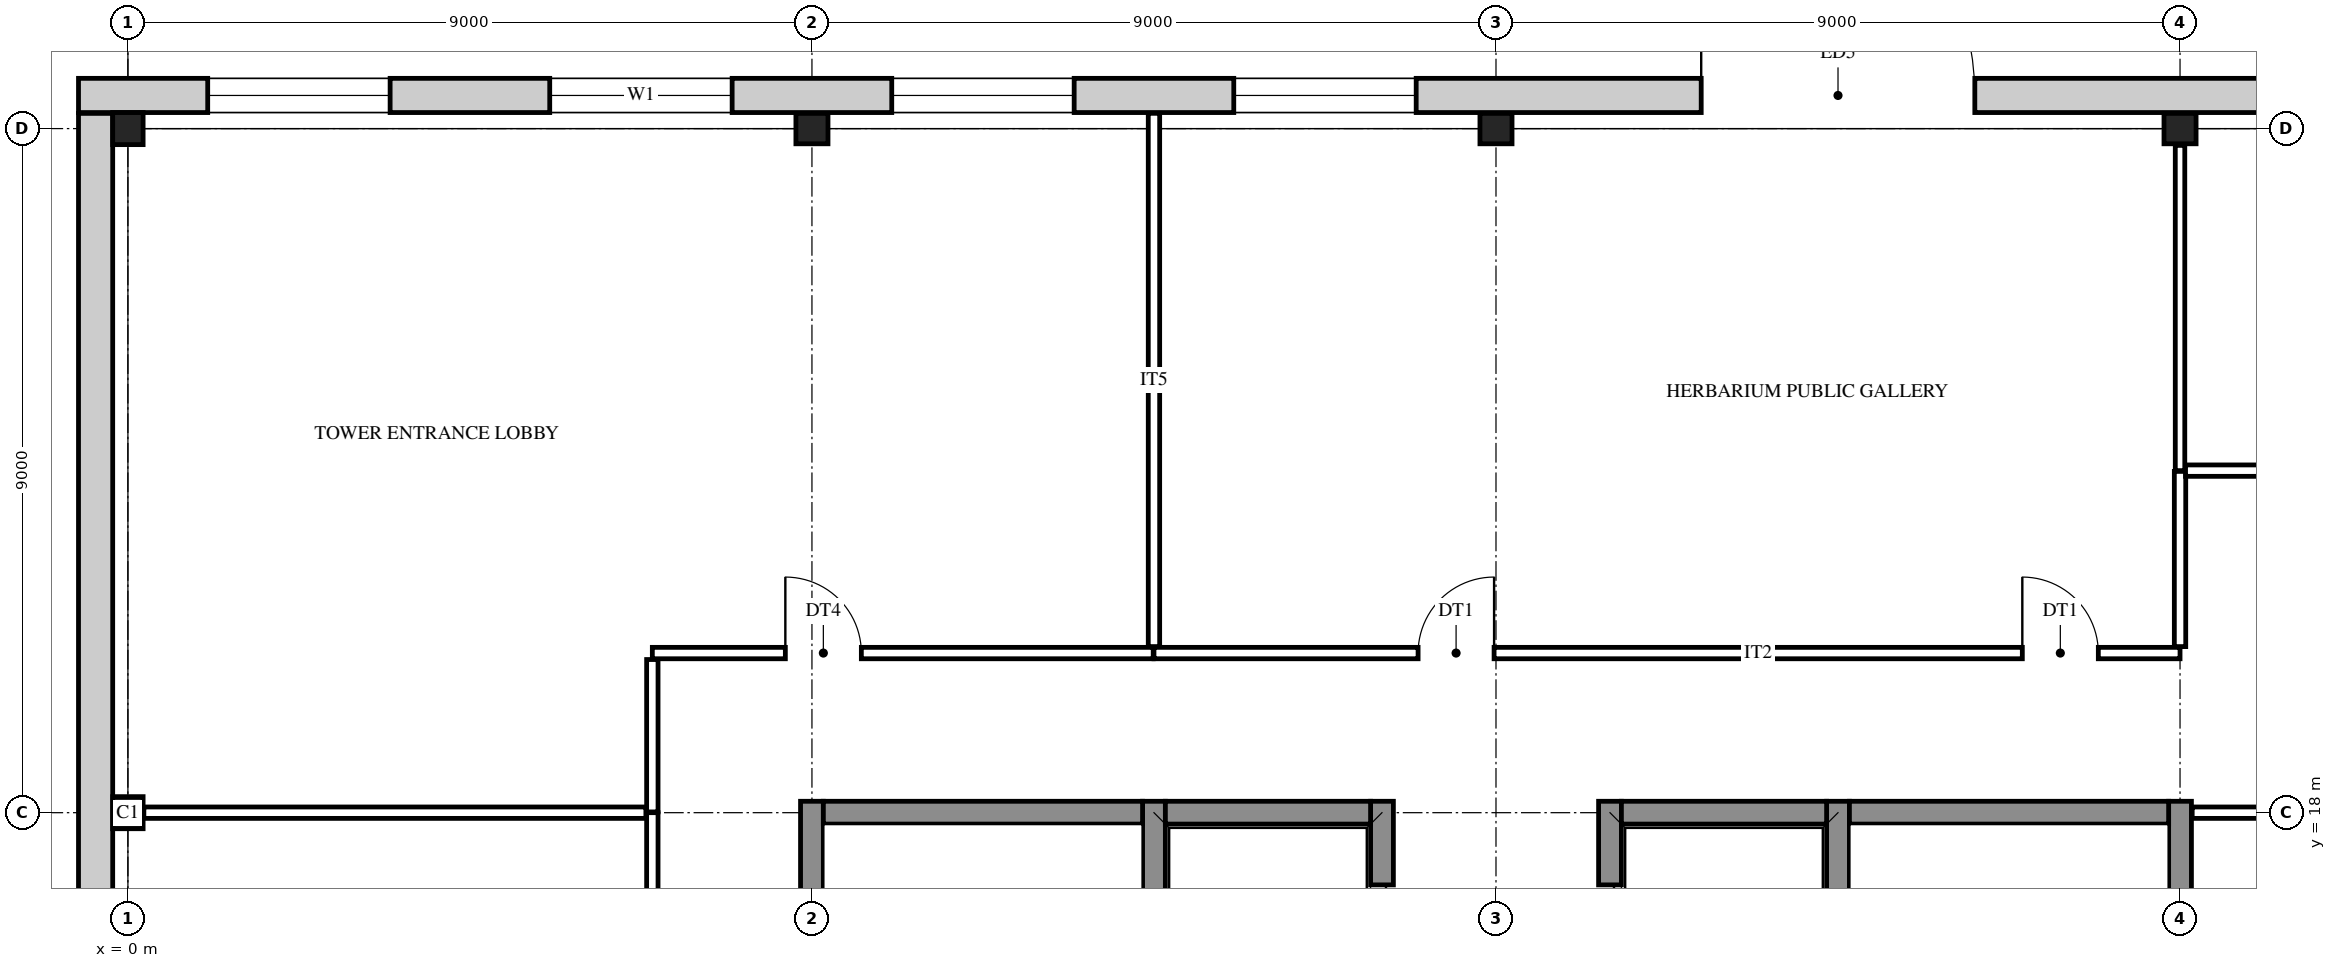
"""IFC4 building model, lengths in metres.
Left out: names, types, materials, properties, quantities, classifications, styles, units other than length and angle.
Written with IfcOpenShell. Run it as: python <this file> out.ifc"""

import sys

from ifc_helpers import new_model, si_unit, direction, frame, frame_2d, origin, origin_2d, place, context, subcontext, project, spatial, rectangle, i_section, extrude, element, fill, save


model = new_model("IFC4")
c1 = context("Model", 3, precision=1e-05, world=origin(), true_north=direction((0.0, 1.0)))
c2 = subcontext(c1, "Body", "Model", "MODEL_VIEW")
j1 = project(units=[si_unit("LENGTHUNIT", "METRE"), si_unit("PLANEANGLEUNIT", "RADIAN")], contexts=[c1])
p1 = place(None, origin())
s1 = spatial("IfcSite", under=j1, at=p1, CompositionType="ELEMENT")
p2 = place(p1, origin())
s2 = spatial("IfcBuilding", under=s1, at=p2, CompositionType="ELEMENT")
p3 = place(p2, origin())
s3 = spatial("IfcBuildingStorey", under=s2, at=p3, CompositionType="ELEMENT", Elevation=0.0)
for number, where, z_axis, x_axis in (
    (1, (0.0, 18.0, 0.0), (0.0, 0.0, 1.0), (1.0, 0.0, 0.0)),
    (2, (0.0, 27.0, 0.0), (0.0, 0.0, 1.0), (1.0, 0.0, 0.0)),
    (3, (9.0, 27.0, 0.0), (0.0, 0.0, 1.0), (0.0, 1.0, 0.0)),
    (4, (18.0, 27.0, 0.0), (0.0, 0.0, 1.0), (0.0, 1.0, 0.0)),
    (5, (27.0, 27.0, 0.0), (0.0, 0.0, 1.0), (0.0, 1.0, 0.0)),
):
    element("IfcColumn", number, at=place(p3, frame(where, z_axis=z_axis, x_axis=x_axis)), inside=s3, PredefinedType="COLUMN", context=c2, shape_type="SweptSolid", body=[
        extrude(i_section(OverallWidth=0.4, OverallDepth=0.422, WebThickness=0.028, FlangeThickness=0.036, at=origin_2d()), origin(), (0.0, 0.0, 1.0), 6.0),
    ])
for number, where, z_axis, x_axis in (
    (6, (9.0, 8.85, 0.0), (0.0, 0.0, 1.0), (0.0, 1.0, 0.0)),
    (7, (13.5, 8.85, 0.0), (0.0, 0.0, 1.0), (0.0, 1.0, 0.0)),
):
    element("IfcWall", number, at=place(p3, frame(where, z_axis=z_axis, x_axis=x_axis)), inside=s3, PredefinedType="SHEAR", context=c2, shape_type="SweptSolid", body=[
        extrude(rectangle(XDim=9.3, YDim=0.3, at=frame_2d((4.65, 0.0))), origin(), (0.0, 0.0, 1.0), 6.0),
    ])
p4 = place(p3, frame((16.5, 8.85, 0.0), z_axis=(0.0, 0.0, 1.0), x_axis=(0.0, 1.0, 0.0)))
e8 = element("IfcWall", 8, at=p4, inside=s3, PredefinedType="SHEAR", context=c2, shape_type="SweptSolid", body=[
    extrude(rectangle(XDim=9.3, YDim=0.3, at=frame_2d((4.65, 0.0))), origin(), (0.0, 0.0, 1.0), 6.0),
])
p5 = place(p4, frame((1.1, 0.0, 0.0)))
e9 = element("IfcOpeningElement", 9, at=p5, cuts=e8, PredefinedType="OPENING", context=c2, shape_type="SweptSolid", body=[
    extrude(rectangle(XDim=1.1, YDim=2.1, at=frame_2d((0.55, 1.05))), frame((0.0, 0.16, 0.0), z_axis=(0.0, -1.0, 0.0), x_axis=(1.0, 0.0, 0.0)), (0.0, 0.0, 1.0), 0.32),
])
p6 = place(p4, frame((4.1, 0.0, 0.0)))
e10 = element("IfcOpeningElement", 10, at=p6, cuts=e8, PredefinedType="OPENING", context=c2, shape_type="SweptSolid", body=[
    extrude(rectangle(XDim=1.1, YDim=2.1, at=frame_2d((0.55, 1.05))), frame((0.0, 0.16, 0.0), z_axis=(0.0, -1.0, 0.0), x_axis=(1.0, 0.0, 0.0)), (0.0, 0.0, 1.0), 0.32),
])
p7 = place(p4, frame((7.1, 0.0, 0.0)))
e11 = element("IfcOpeningElement", 11, at=p7, cuts=e8, PredefinedType="OPENING", context=c2, shape_type="SweptSolid", body=[
    extrude(rectangle(XDim=1.1, YDim=2.1, at=frame_2d((0.55, 1.05))), frame((0.0, 0.16, 0.0), z_axis=(0.0, -1.0, 0.0), x_axis=(1.0, 0.0, 0.0)), (0.0, 0.0, 1.0), 0.32),
])
p8 = place(p3, frame((19.5, 8.85, 0.0), z_axis=(0.0, 0.0, 1.0), x_axis=(0.0, 1.0, 0.0)))
e12 = element("IfcWall", 12, at=p8, inside=s3, PredefinedType="SHEAR", context=c2, shape_type="SweptSolid", body=[
    extrude(rectangle(XDim=9.3, YDim=0.3, at=frame_2d((4.65, 0.0))), origin(), (0.0, 0.0, 1.0), 6.0),
])
p9 = place(p8, frame((1.1, 0.0, 0.0)))
e13 = element("IfcOpeningElement", 13, at=p9, cuts=e12, PredefinedType="OPENING", context=c2, shape_type="SweptSolid", body=[
    extrude(rectangle(XDim=1.1, YDim=2.1, at=frame_2d((0.55, 1.05))), frame((0.0, 0.16, 0.0), z_axis=(0.0, -1.0, 0.0), x_axis=(1.0, 0.0, 0.0)), (0.0, 0.0, 1.0), 0.32),
])
p10 = place(p8, frame((3.95, 0.0, 0.0)))
e14 = element("IfcOpeningElement", 14, at=p10, cuts=e12, PredefinedType="OPENING", context=c2, shape_type="SweptSolid", body=[
    extrude(rectangle(XDim=1.4, YDim=2.1, at=frame_2d((0.7, 1.05))), frame((0.0, 0.16, 0.0), z_axis=(0.0, -1.0, 0.0), x_axis=(1.0, 0.0, 0.0)), (0.0, 0.0, 1.0), 0.32),
])
p11 = place(p8, frame((7.1, 0.0, 0.0)))
e15 = element("IfcOpeningElement", 15, at=p11, cuts=e12, PredefinedType="OPENING", context=c2, shape_type="SweptSolid", body=[
    extrude(rectangle(XDim=1.1, YDim=2.1, at=frame_2d((0.55, 1.05))), frame((0.0, 0.16, 0.0), z_axis=(0.0, -1.0, 0.0), x_axis=(1.0, 0.0, 0.0)), (0.0, 0.0, 1.0), 0.32),
])
for number, where, z_axis, x_axis in (
    (16, (22.5, 8.85, 0.0), (0.0, 0.0, 1.0), (0.0, 1.0, 0.0)),
    (17, (27.0, 8.85, 0.0), (0.0, 0.0, 1.0), (0.0, 1.0, 0.0)),
):
    element("IfcWall", number, at=place(p3, frame(where, z_axis=z_axis, x_axis=x_axis)), inside=s3, PredefinedType="SHEAR", context=c2, shape_type="SweptSolid", body=[
        extrude(rectangle(XDim=9.3, YDim=0.3, at=frame_2d((4.65, 0.0))), origin(), (0.0, 0.0, 1.0), 6.0),
    ])
p12 = place(p3, frame((9.15, 18.0, 0.0), z_axis=(0.0, 0.0, 1.0), x_axis=(1.0, 0.0, 0.0)))
e18 = element("IfcWall", 18, at=p12, inside=s3, PredefinedType="SHEAR", context=c2, shape_type="SweptSolid", body=[
    extrude(rectangle(XDim=4.2, YDim=0.3, at=frame_2d((2.1, 0.0))), origin(), (0.0, 0.0, 1.0), 6.0),
])
for number, where, z_axis, x_axis in (
    (19, (13.65, 18.0, 0.0), (0.0, 0.0, 1.0), (1.0, 0.0, 0.0)),
    (20, (19.65, 18.0, 0.0), (0.0, 0.0, 1.0), (1.0, 0.0, 0.0)),
):
    element("IfcWall", number, at=place(p3, frame(where, z_axis=z_axis, x_axis=x_axis)), inside=s3, PredefinedType="SHEAR", context=c2, shape_type="SweptSolid", body=[
        extrude(rectangle(XDim=2.7, YDim=0.3, at=frame_2d((1.35, 0.0))), origin(), (0.0, 0.0, 1.0), 6.0),
    ])
p13 = place(p3, frame((22.65, 18.0, 0.0), z_axis=(0.0, 0.0, 1.0), x_axis=(1.0, 0.0, 0.0)))
e21 = element("IfcWall", 21, at=p13, inside=s3, PredefinedType="SHEAR", context=c2, shape_type="SweptSolid", body=[
    extrude(rectangle(XDim=4.2, YDim=0.3, at=frame_2d((2.1, 0.0))), origin(), (0.0, 0.0, 1.0), 6.0),
])
p14 = place(p3, frame((-0.425, -0.2, 0.0), z_axis=(0.0, 0.0, 1.0), x_axis=(0.0, 1.0, 0.0)))
e22 = element("IfcWall", 22, at=p14, inside=s3, PredefinedType="STANDARD", context=c2, shape_type="SweptSolid", body=[
    extrude(rectangle(XDim=27.4, YDim=0.45, at=frame_2d((13.7, 0.0))), origin(), (0.0, 0.0, 1.0), 6.0),
])
p15 = place(p14, frame((14.6, 0.0, 0.012)))
e23 = element("IfcOpeningElement", 23, at=p15, cuts=e22, PredefinedType="OPENING", context=c2, shape_type="SweptSolid", body=[
    extrude(rectangle(XDim=2.4, YDim=2.4, at=frame_2d((1.2, 1.2))), frame((0.0, 0.235, 0.0), z_axis=(0.0, -1.0, 0.0), x_axis=(1.0, 0.0, 0.0)), (0.0, 0.0, 1.0), 0.47),
])
p16 = place(p14, frame((4.1, 0.0, 0.012)))
e24 = element("IfcOpeningElement", 24, at=p16, cuts=e22, PredefinedType="OPENING", context=c2, shape_type="SweptSolid", body=[
    extrude(rectangle(XDim=1.2, YDim=2.4, at=frame_2d((0.6, 1.2))), frame((0.0, 0.235, 0.0), z_axis=(0.0, -1.0, 0.0), x_axis=(1.0, 0.0, 0.0)), (0.0, 0.0, 1.0), 0.47),
])
p17 = place(p14, frame((10.25, 0.0, 0.9)))
e25 = element("IfcOpeningElement", 25, at=p17, cuts=e22, PredefinedType="OPENING", context=c2, shape_type="SweptSolid", body=[
    extrude(rectangle(XDim=2.4, YDim=3.5, at=frame_2d((1.2, 1.75))), frame((0.0, 0.235, 0.0), z_axis=(0.0, -1.0, 0.0), x_axis=(1.0, 0.0, 0.0)), (0.0, 0.0, 1.0), 0.47),
])
p18 = place(p3, frame((-0.65, 27.436, 0.0), z_axis=(0.0, 0.0, 1.0), x_axis=(1.0, 0.0, 0.0)))
e26 = element("IfcWall", 26, at=p18, inside=s3, PredefinedType="STANDARD", context=c2, shape_type="SweptSolid", body=[
    extrude(rectangle(XDim=32.8, YDim=0.45, at=frame_2d((16.4, 0.0))), origin(), (0.0, 0.0, 1.0), 6.0),
])
p19 = place(p18, frame((21.35, 0.0, 0.012)))
e27 = element("IfcOpeningElement", 27, at=p19, cuts=e26, PredefinedType="OPENING", context=c2, shape_type="SweptSolid", body=[
    extrude(rectangle(XDim=3.6, YDim=2.7, at=frame_2d((1.8, 1.35))), frame((0.0, 0.235, 0.0), z_axis=(0.0, -1.0, 0.0), x_axis=(1.0, 0.0, 0.0)), (0.0, 0.0, 1.0), 0.47),
])
p20 = place(p18, frame((1.7, 0.0, 0.9)))
e28 = element("IfcOpeningElement", 28, at=p20, cuts=e26, PredefinedType="OPENING", context=c2, shape_type="SweptSolid", body=[
    extrude(rectangle(XDim=2.4, YDim=3.5, at=frame_2d((1.2, 1.75))), frame((0.0, 0.235, 0.0), z_axis=(0.0, -1.0, 0.0), x_axis=(1.0, 0.0, 0.0)), (0.0, 0.0, 1.0), 0.47),
])
p21 = place(p18, frame((6.2, 0.0, 0.9)))
e29 = element("IfcOpeningElement", 29, at=p21, cuts=e26, PredefinedType="OPENING", context=c2, shape_type="SweptSolid", body=[
    extrude(rectangle(XDim=2.4, YDim=3.5, at=frame_2d((1.2, 1.75))), frame((0.0, 0.235, 0.0), z_axis=(0.0, -1.0, 0.0), x_axis=(1.0, 0.0, 0.0)), (0.0, 0.0, 1.0), 0.47),
])
p22 = place(p18, frame((10.7, 0.0, 0.9)))
e30 = element("IfcOpeningElement", 30, at=p22, cuts=e26, PredefinedType="OPENING", context=c2, shape_type="SweptSolid", body=[
    extrude(rectangle(XDim=2.4, YDim=3.5, at=frame_2d((1.2, 1.75))), frame((0.0, 0.235, 0.0), z_axis=(0.0, -1.0, 0.0), x_axis=(1.0, 0.0, 0.0)), (0.0, 0.0, 1.0), 0.47),
])
p23 = place(p18, frame((15.2, 0.0, 0.9)))
e31 = element("IfcOpeningElement", 31, at=p23, cuts=e26, PredefinedType="OPENING", context=c2, shape_type="SweptSolid", body=[
    extrude(rectangle(XDim=2.4, YDim=3.5, at=frame_2d((1.2, 1.75))), frame((0.0, 0.235, 0.0), z_axis=(0.0, -1.0, 0.0), x_axis=(1.0, 0.0, 0.0)), (0.0, 0.0, 1.0), 0.47),
])
p24 = place(p18, frame((28.7, 0.0, 0.9)))
e32 = element("IfcOpeningElement", 32, at=p24, cuts=e26, PredefinedType="OPENING", context=c2, shape_type="SweptSolid", body=[
    extrude(rectangle(XDim=2.4, YDim=3.5, at=frame_2d((1.2, 1.75))), frame((0.0, 0.235, 0.0), z_axis=(0.0, -1.0, 0.0), x_axis=(1.0, 0.0, 0.0)), (0.0, 0.0, 1.0), 0.47),
])
p25 = place(p3, frame((6.9, 6.9, 0.0), z_axis=(0.0, 0.0, 1.0), x_axis=(0.0, 1.0, 0.0)))
e33 = element("IfcWall", 33, at=p25, inside=s3, PredefinedType="PARTITIONING", context=c2, shape_type="SweptSolid", body=[
    extrude(rectangle(XDim=11.1, YDim=0.15, at=frame_2d((5.55, 0.0))), origin(), (0.0, 0.0, 1.0), 5.218),
])
p26 = place(p25, frame((6.1, 0.0, 0.0)))
e34 = element("IfcOpeningElement", 34, at=p26, cuts=e33, PredefinedType="OPENING", context=c2, shape_type="SweptSolid", body=[
    extrude(rectangle(XDim=1.0, YDim=2.1, at=frame_2d((0.5, 1.05))), frame((0.0, 0.085, 0.0), z_axis=(0.0, -1.0, 0.0), x_axis=(1.0, 0.0, 0.0)), (0.0, 0.0, 1.0), 0.17),
])
p27 = place(p3, frame((6.9, 18.01, 0.0), z_axis=(0.0, 0.0, 1.0), x_axis=(0.0, 1.0, 0.0)))
e35 = element("IfcWall", 35, at=p27, inside=s3, PredefinedType="PARTITIONING", context=c2, shape_type="SweptSolid", body=[
    extrude(rectangle(XDim=2.005, YDim=0.15, at=frame_2d((1.002, 0.0))), origin(), (0.0, 0.0, 1.0), 5.218),
])
p28 = place(p3, frame((13.5, 20.185, 0.0), z_axis=(0.0, 0.0, 1.0), x_axis=(0.0, 1.0, 0.0)))
e36 = element("IfcWall", 36, at=p28, inside=s3, PredefinedType="PARTITIONING", context=c2, shape_type="SweptSolid", body=[
    extrude(rectangle(XDim=7.016, YDim=0.15, at=frame_2d((3.508, 0.0))), origin(), (0.0, 0.0, 1.0), 5.218),
])
p29 = place(p3, frame((27.0, 20.185, 0.0), z_axis=(0.0, 0.0, 1.0), x_axis=(0.0, 1.0, 0.0)))
e37 = element("IfcWall", 37, at=p29, inside=s3, PredefinedType="PARTITIONING", context=c2, shape_type="SweptSolid", body=[
    extrude(rectangle(XDim=2.305, YDim=0.15, at=frame_2d((1.152, 0.0))), origin(), (0.0, 0.0, 1.0), 5.218),
])
p30 = place(p3, frame((27.0, 22.5, 0.0), z_axis=(0.0, 0.0, 1.0), x_axis=(0.0, 1.0, 0.0)))
e38 = element("IfcWall", 38, at=p30, inside=s3, PredefinedType="PARTITIONING", context=c2, shape_type="SweptSolid", body=[
    extrude(rectangle(XDim=4.279, YDim=0.125, at=frame_2d((2.14, 0.0))), origin(), (0.0, 0.0, 1.0), 5.218),
])
p31 = place(p3, frame((0.21, 18.0, 0.0), z_axis=(0.0, 0.0, 1.0), x_axis=(1.0, 0.0, 0.0)))
e39 = element("IfcWall", 39, at=p31, inside=s3, PredefinedType="PARTITIONING", context=c2, shape_type="SweptSolid", body=[
    extrude(rectangle(XDim=6.605, YDim=0.15, at=frame_2d((3.302, 0.0))), origin(), (0.0, 0.0, 1.0), 5.218),
])
p32 = place(p3, frame((27.16, 18.0, 0.0), z_axis=(0.0, 0.0, 1.0), x_axis=(1.0, 0.0, 0.0)))
e40 = element("IfcWall", 40, at=p32, inside=s3, PredefinedType="PARTITIONING", context=c2, shape_type="SweptSolid", body=[
    extrude(rectangle(XDim=4.13, YDim=0.15, at=frame_2d((2.065, 0.0))), origin(), (0.0, 0.0, 1.0), 5.218),
])
p33 = place(p3, frame((6.9, 20.1, 0.0), z_axis=(0.0, 0.0, 1.0), x_axis=(1.0, 0.0, 0.0)))
e41 = element("IfcWall", 41, at=p33, inside=s3, PredefinedType="PARTITIONING", context=c2, shape_type="SweptSolid", body=[
    extrude(rectangle(XDim=6.59, YDim=0.15, at=frame_2d((3.295, 0.0))), origin(), (0.0, 0.0, 1.0), 5.218),
])
p34 = place(p33, frame((1.75, 0.0, 0.0)))
e42 = element("IfcOpeningElement", 42, at=p34, cuts=e41, PredefinedType="OPENING", context=c2, shape_type="SweptSolid", body=[
    extrude(rectangle(XDim=1.0, YDim=2.1, at=frame_2d((0.5, 1.05))), frame((0.0, 0.085, 0.0), z_axis=(0.0, -1.0, 0.0), x_axis=(1.0, 0.0, 0.0)), (0.0, 0.0, 1.0), 0.17),
])
p35 = place(p3, frame((13.5, 20.1, 0.0), z_axis=(0.0, 0.0, 1.0), x_axis=(1.0, 0.0, 0.0)))
e43 = element("IfcWall", 43, at=p35, inside=s3, PredefinedType="PARTITIONING", context=c2, shape_type="SweptSolid", body=[
    extrude(rectangle(XDim=13.5, YDim=0.15, at=frame_2d((6.75, 0.0))), origin(), (0.0, 0.0, 1.0), 5.218),
])
p36 = place(p35, frame((3.475, 0.0, 0.0)))
e44 = element("IfcOpeningElement", 44, at=p36, cuts=e43, PredefinedType="OPENING", context=c2, shape_type="SweptSolid", body=[
    extrude(rectangle(XDim=1.0, YDim=2.1, at=frame_2d((0.5, 1.05))), frame((0.0, 0.085, 0.0), z_axis=(0.0, -1.0, 0.0), x_axis=(1.0, 0.0, 0.0)), (0.0, 0.0, 1.0), 0.17),
])
p37 = place(p35, frame((11.425, 0.0, 0.0)))
e45 = element("IfcOpeningElement", 45, at=p37, cuts=e43, PredefinedType="OPENING", context=c2, shape_type="SweptSolid", body=[
    extrude(rectangle(XDim=1.0, YDim=2.1, at=frame_2d((0.5, 1.05))), frame((0.0, 0.085, 0.0), z_axis=(0.0, -1.0, 0.0), x_axis=(1.0, 0.0, 0.0)), (0.0, 0.0, 1.0), 0.17),
])
p38 = place(p3, frame((27.073, 22.5, 0.0), z_axis=(0.0, 0.0, 1.0), x_axis=(1.0, 0.0, 0.0)))
e46 = element("IfcWall", 46, at=p38, inside=s3, PredefinedType="PARTITIONING", context=c2, shape_type="SweptSolid", body=[
    extrude(rectangle(XDim=4.292, YDim=0.15, at=frame_2d((2.146, 0.0))), origin(), (0.0, 0.0, 1.0), 5.218),
])
p39 = place(p38, frame((1.677, 0.0, 0.0)))
e47 = element("IfcOpeningElement", 47, at=p39, cuts=e46, PredefinedType="OPENING", context=c2, shape_type="SweptSolid", body=[
    extrude(rectangle(XDim=1.0, YDim=2.1, at=frame_2d((0.5, 1.05))), frame((0.0, 0.085, 0.0), z_axis=(0.0, -1.0, 0.0), x_axis=(1.0, 0.0, 0.0)), (0.0, 0.0, 1.0), 0.17),
])
p40 = place(p19, origin())
e48 = element("IfcDoor", 48, at=p40, inside=s3, OperationType="DOUBLE_DOOR_DOUBLE_SWING", PredefinedType="DOOR", context=c2, shape_type="SweptSolid", body=[
    extrude(rectangle(XDim=3.6, YDim=2.7, at=frame_2d((1.8, 1.35))), frame((0.0, 0.025, 0.0), z_axis=(0.0, -1.0, 0.0), x_axis=(1.0, 0.0, 0.0)), (0.0, 0.0, 1.0), 0.05),
])
fill(e27, e48)
p41 = place(p20, origin())
e49 = element("IfcWindow", 49, at=p41, inside=s3, PartitioningType="SINGLE_PANEL", PredefinedType="WINDOW", context=c2, shape_type="SweptSolid", body=[
    extrude(rectangle(XDim=2.4, YDim=3.5, at=frame_2d((1.2, 1.75))), frame((0.0, 0.03, 0.0), z_axis=(0.0, -1.0, 0.0), x_axis=(1.0, 0.0, 0.0)), (0.0, 0.0, 1.0), 0.06),
])
fill(e28, e49)
p42 = place(p21, origin())
e50 = element("IfcWindow", 50, at=p42, inside=s3, PartitioningType="SINGLE_PANEL", PredefinedType="WINDOW", context=c2, shape_type="SweptSolid", body=[
    extrude(rectangle(XDim=2.4, YDim=3.5, at=frame_2d((1.2, 1.75))), frame((0.0, 0.03, 0.0), z_axis=(0.0, -1.0, 0.0), x_axis=(1.0, 0.0, 0.0)), (0.0, 0.0, 1.0), 0.06),
])
fill(e29, e50)
p43 = place(p22, origin())
e51 = element("IfcWindow", 51, at=p43, inside=s3, PartitioningType="SINGLE_PANEL", PredefinedType="WINDOW", context=c2, shape_type="SweptSolid", body=[
    extrude(rectangle(XDim=2.4, YDim=3.5, at=frame_2d((1.2, 1.75))), frame((0.0, 0.03, 0.0), z_axis=(0.0, -1.0, 0.0), x_axis=(1.0, 0.0, 0.0)), (0.0, 0.0, 1.0), 0.06),
])
fill(e30, e51)
p44 = place(p23, origin())
e52 = element("IfcWindow", 52, at=p44, inside=s3, PartitioningType="SINGLE_PANEL", PredefinedType="WINDOW", context=c2, shape_type="SweptSolid", body=[
    extrude(rectangle(XDim=2.4, YDim=3.5, at=frame_2d((1.2, 1.75))), frame((0.0, 0.03, 0.0), z_axis=(0.0, -1.0, 0.0), x_axis=(1.0, 0.0, 0.0)), (0.0, 0.0, 1.0), 0.06),
])
fill(e31, e52)
p45 = place(p34, origin())
e53 = element("IfcDoor", 53, at=p45, inside=s3, OperationType="SINGLE_SWING_LEFT", PredefinedType="DOOR", context=c2, shape_type="SweptSolid", body=[
    extrude(rectangle(XDim=1.0, YDim=2.1, at=frame_2d((0.5, 1.05))), frame((0.0, 0.025, 0.0), z_axis=(0.0, -1.0, 0.0), x_axis=(1.0, 0.0, 0.0)), (0.0, 0.0, 1.0), 0.05),
])
fill(e42, e53)
p46 = place(p36, origin())
e54 = element("IfcDoor", 54, at=p46, inside=s3, OperationType="SINGLE_SWING_RIGHT", PredefinedType="DOOR", context=c2, shape_type="SweptSolid", body=[
    extrude(rectangle(XDim=1.0, YDim=2.1, at=frame_2d((0.5, 1.05))), frame((0.0, 0.025, 0.0), z_axis=(0.0, -1.0, 0.0), x_axis=(1.0, 0.0, 0.0)), (0.0, 0.0, 1.0), 0.05),
])
fill(e44, e54)
p47 = place(p37, origin())
e55 = element("IfcDoor", 55, at=p47, inside=s3, OperationType="SINGLE_SWING_LEFT", PredefinedType="DOOR", context=c2, shape_type="SweptSolid", body=[
    extrude(rectangle(XDim=1.0, YDim=2.1, at=frame_2d((0.5, 1.05))), frame((0.0, 0.025, 0.0), z_axis=(0.0, -1.0, 0.0), x_axis=(1.0, 0.0, 0.0)), (0.0, 0.0, 1.0), 0.05),
])
fill(e45, e55)
p48 = place(p7, origin())
e56 = element("IfcDoor", 56, at=p48, inside=s3, OperationType="DOUBLE_DOOR_SLIDING", PredefinedType="DOOR", context=c2, shape_type="SweptSolid", body=[
    extrude(rectangle(XDim=1.1, YDim=2.1, at=frame_2d((0.55, 1.05))), frame((0.0, 0.025, 0.0), z_axis=(0.0, -1.0, 0.0), x_axis=(1.0, 0.0, 0.0)), (0.0, 0.0, 1.0), 0.05),
])
fill(e11, e56)
p49 = place(p11, origin())
e57 = element("IfcDoor", 57, at=p49, inside=s3, OperationType="DOUBLE_DOOR_SLIDING", PredefinedType="DOOR", context=c2, shape_type="SweptSolid", body=[
    extrude(rectangle(XDim=1.1, YDim=2.1, at=frame_2d((0.55, 1.05))), frame((0.0, 0.025, 0.0), z_axis=(0.0, -1.0, 0.0), x_axis=(1.0, 0.0, 0.0)), (0.0, 0.0, 1.0), 0.05),
])
fill(e15, e57)
save(model, sys.argv[1])
